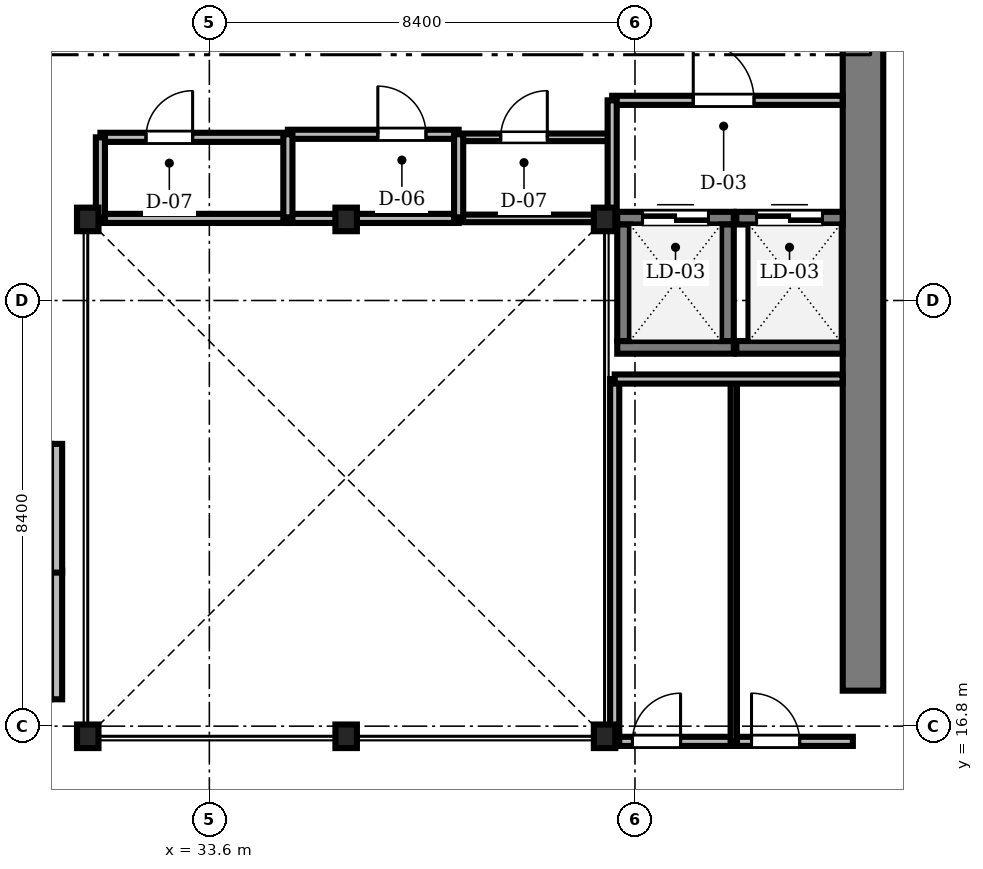
"""IFC4 building model, lengths in metres.
Left out: names, types, materials, properties, quantities, classifications, styles, units other than length and angle.
Written with IfcOpenShell. Run it as: python <this file> out.ifc"""

import sys

from ifc_helpers import new_model, si_unit, direction, frame, frame_2d, origin, origin_2d, place, context, subcontext, project, spatial, rectangle, i_section, extrude, source, transform, mapped, element, fill, save


model = new_model("IFC4")
c1 = context("Model", 3, precision=1e-05, world=origin(), true_north=direction((0.0, 1.0)))
c2 = subcontext(c1, "Body", "Model", "MODEL_VIEW")
j1 = project(units=[si_unit("LENGTHUNIT", "METRE"), si_unit("PLANEANGLEUNIT", "RADIAN")], contexts=[c1])
p1 = place(None, origin())
s1 = spatial("IfcSite", under=j1, at=p1, CompositionType="ELEMENT")
p2 = place(p1, origin())
s2 = spatial("IfcBuilding", under=s1, at=p2, CompositionType="ELEMENT")
p3 = place(p2, frame((0.0, 0.0, 115.0)))
s3 = spatial("IfcBuildingStorey", under=s2, at=p3, CompositionType="ELEMENT", Elevation=115.0)
m1 = source(origin(), c2, "Body", "SweptSolid", [
    extrude(rectangle(XDim=13.15, YDim=0.8, at=frame_2d((6.575, 0.0))), origin(), (0.0, 0.0, 1.0), 3.46),
])
p4 = place(p3, frame((46.5, 17.5, 0.0), z_axis=(0.0, 0.0, 1.0), x_axis=(0.0, 1.0, 0.0)))
e1 = element("IfcWall", 1, at=p4, inside=s3, PredefinedType="SHEAR", context=c2, shape_type="MappedRepresentation", body=[
    mapped(m1, transform((0.0, 0.0, 0.0), scale=1.0)),
])
m2 = source(origin(), c2, "Body", "SweptSolid", [
    extrude(i_section(OverallWidth=0.424, OverallDepth=0.465, WebThickness=0.035, FlangeThickness=0.056, FilletRadius=0.015, at=origin_2d()), origin(), (0.0, 0.0, 1.0), 3.46),
])
for number, where, z_axis, x_axis in (
    (2, (31.2, 16.6, 0.0), (0.0, 0.0, 1.0), (1.0, 0.0, 0.0)),
    (3, (36.3, 16.6, 0.0), (0.0, 0.0, 1.0), (1.0, 0.0, 0.0)),
    (4, (41.4, 16.6, 0.0), (0.0, 0.0, 1.0), (1.0, 0.0, 0.0)),
    (5, (41.4, 26.8, 0.0), (0.0, 0.0, 1.0), (1.0, 0.0, 0.0)),
    (6, (36.3, 26.8, 0.0), (0.0, 0.0, 1.0), (1.0, 0.0, 0.0)),
    (7, (31.2, 26.8, 0.0), (0.0, 0.0, 1.0), (1.0, 0.0, 0.0)),
):
    element("IfcColumn", number, at=place(p3, frame(where, z_axis=z_axis, x_axis=x_axis)), inside=s3, PredefinedType="COLUMN", context=c2, shape_type="MappedRepresentation", body=[
        mapped(m2, transform((0.0, 0.0, 0.0), scale=1.0)),
    ])
m3 = source(origin(), c2, "Body", "SweptSolid", [
    extrude(rectangle(XDim=2.54, YDim=0.22, at=frame_2d((1.27, 0.0))), origin(), (0.0, 0.0, 1.0), 3.46),
])
for number, where, z_axis, x_axis in (
    (8, (30.585, 17.33, 0.0), (0.0, 0.0, 1.0), (0.0, 1.0, 0.0)),
    (9, (30.585, 19.83, 0.0), (0.0, 0.0, 1.0), (0.0, 1.0, 0.0)),
):
    element("IfcWall", number, at=place(p3, frame(where, z_axis=z_axis, x_axis=x_axis)), inside=s3, PredefinedType="SOLIDWALL", context=c2, shape_type="MappedRepresentation", body=[
        mapped(m3, transform((0.0, 0.0, 0.0), scale=1.0)),
    ])
m4 = source(origin(), c2, "Body", "SweptSolid", [
    extrude(rectangle(XDim=2.3, YDim=0.25, at=frame_2d((1.15, 0.0))), origin(), (0.0, 0.0, 1.0), 3.46),
])
p5 = place(p3, frame((41.65, 24.275, 0.0), z_axis=(0.0, 0.0, 1.0), x_axis=(1.0, 0.0, 0.0)))
e10 = element("IfcWall", 10, at=p5, inside=s3, PredefinedType="SOLIDWALL", context=c2, shape_type="MappedRepresentation", body=[
    mapped(m4, transform((0.0, 0.0, 0.0), scale=1.0)),
])
p6 = place(p3, frame((41.65, 26.825, 0.0), z_axis=(0.0, 0.0, 1.0), x_axis=(1.0, 0.0, 0.0)))
e11 = element("IfcWall", 11, at=p6, inside=s3, PredefinedType="SOLIDWALL", context=c2, shape_type="MappedRepresentation", body=[
    mapped(m4, transform((0.0, 0.0, 0.0), scale=1.0)),
])
m5 = source(origin(), c2, "Body", "SweptSolid", [
    extrude(rectangle(XDim=1.3, YDim=2.3, at=frame_2d((0.65, 1.15))), frame((0.0, 0.135, 0.0), z_axis=(0.0, -1.0, 0.0), x_axis=(1.0, 0.0, 0.0)), (0.0, 0.0, 1.0), 0.27),
])
p7 = place(p6, frame((0.5, 0.0, 0.0)))
e12 = element("IfcOpeningElement", 12, at=p7, cuts=e11, PredefinedType="OPENING", context=c2, shape_type="MappedRepresentation", body=[
    mapped(m5, transform((0.0, 0.0, 0.0), scale=1.0)),
])
for number, where, z_axis, x_axis in (
    (13, (41.775, 24.4, 0.0), (0.0, 0.0, 1.0), (0.0, 1.0, 0.0)),
    (14, (43.825, 24.4, 0.0), (0.0, 0.0, 1.0), (0.0, 1.0, 0.0)),
):
    element("IfcWall", number, at=place(p3, frame(where, z_axis=z_axis, x_axis=x_axis)), inside=s3, PredefinedType="SOLIDWALL", context=c2, shape_type="MappedRepresentation", body=[
        mapped(m4, transform((0.0, 0.0, 0.0), scale=1.0)),
    ])
m6 = source(origin(), c2, "Body", "SweptSolid", [
    extrude(rectangle(XDim=2.1, YDim=0.25, at=frame_2d((1.05, 0.0))), origin(), (0.0, 0.0, 1.0), 3.46),
])
p8 = place(p3, frame((44.0, 24.275, 0.0), z_axis=(0.0, 0.0, 1.0), x_axis=(1.0, 0.0, 0.0)))
e15 = element("IfcWall", 15, at=p8, inside=s3, PredefinedType="SOLIDWALL", context=c2, shape_type="MappedRepresentation", body=[
    mapped(m6, transform((0.0, 0.0, 0.0), scale=1.0)),
])
p9 = place(p3, frame((44.0, 26.825, 0.0), z_axis=(0.0, 0.0, 1.0), x_axis=(1.0, 0.0, 0.0)))
e16 = element("IfcWall", 16, at=p9, inside=s3, PredefinedType="SOLIDWALL", context=c2, shape_type="MappedRepresentation", body=[
    mapped(m6, transform((0.0, 0.0, 0.0), scale=1.0)),
])
p10 = place(p9, frame((0.4, 0.0, 0.0)))
e17 = element("IfcOpeningElement", 17, at=p10, cuts=e16, PredefinedType="OPENING", context=c2, shape_type="MappedRepresentation", body=[
    mapped(m5, transform((0.0, 0.0, 0.0), scale=1.0)),
])
m7 = source(origin(), c2, "Body", "SweptSolid", [
    extrude(rectangle(XDim=4.548, YDim=0.18, at=frame_2d((2.274, 0.0))), origin(), (0.0, 0.0, 1.0), 3.092),
])
p11 = place(p3, frame((41.55, 29.15, 0.0), z_axis=(0.0, 0.0, 1.0), x_axis=(1.0, 0.0, 0.0)))
e18 = element("IfcWall", 18, at=p11, inside=s3, PredefinedType="PARTITIONING", context=c2, shape_type="MappedRepresentation", body=[
    mapped(m7, transform((0.0, 0.0, 0.0), scale=1.0)),
])
m8 = source(origin(), c2, "Body", "SweptSolid", [
    extrude(rectangle(XDim=1.2, YDim=2.2, at=frame_2d((0.6, 1.1))), frame((0.0, 0.1, 0.0), z_axis=(0.0, -1.0, 0.0), x_axis=(1.0, 0.0, 0.0)), (0.0, 0.0, 1.0), 0.2),
])
p12 = place(p11, frame((1.6, 0.0, 0.0)))
e19 = element("IfcOpeningElement", 19, at=p12, cuts=e18, PredefinedType="OPENING", context=c2, shape_type="MappedRepresentation", body=[
    mapped(m8, transform((0.0, 0.0, 0.0), scale=1.0)),
])
m9 = source(origin(), c2, "Body", "SweptSolid", [
    extrude(rectangle(XDim=4.7, YDim=0.18, at=frame_2d((2.35, 0.0))), origin(), (0.0, 0.0, 1.0), 2.852),
])
p13 = place(p3, frame((41.6, 16.5, 0.0), z_axis=(0.0, 0.0, 1.0), x_axis=(1.0, 0.0, 0.0)))
e20 = element("IfcWall", 20, at=p13, inside=s3, PredefinedType="PARTITIONING", context=c2, shape_type="MappedRepresentation", body=[
    mapped(m9, transform((0.0, 0.0, 0.0), scale=1.0)),
])
m10 = source(origin(), c2, "Body", "SweptSolid", [
    extrude(rectangle(XDim=0.95, YDim=2.15, at=frame_2d((0.475, 1.075))), frame((0.0, 0.1, 0.0), z_axis=(0.0, -1.0, 0.0), x_axis=(1.0, 0.0, 0.0)), (0.0, 0.0, 1.0), 0.2),
])
p14 = place(p13, frame((0.35, 0.0, 0.0)))
e21 = element("IfcOpeningElement", 21, at=p14, cuts=e20, PredefinedType="OPENING", context=c2, shape_type="MappedRepresentation", body=[
    mapped(m10, transform((0.0, 0.0, 0.0), scale=1.0)),
])
p15 = place(p13, frame((2.7, 0.0, 0.0)))
e22 = element("IfcOpeningElement", 22, at=p15, cuts=e20, PredefinedType="OPENING", context=c2, shape_type="MappedRepresentation", body=[
    mapped(m10, transform((0.0, 0.0, 0.0), scale=1.0)),
])
m11 = source(origin(), c2, "Body", "SweptSolid", [
    extrude(rectangle(XDim=3.7, YDim=0.18, at=frame_2d((1.85, 0.0))), origin(), (0.0, 0.0, 1.0), 3.092),
])
p16 = place(p3, frame((31.45, 28.42, 0.0), z_axis=(0.0, 0.0, 1.0), x_axis=(1.0, 0.0, 0.0)))
e23 = element("IfcWall", 23, at=p16, inside=s3, PredefinedType="PARTITIONING", context=c2, shape_type="MappedRepresentation", body=[
    mapped(m11, transform((0.0, 0.0, 0.0), scale=1.0)),
])
m12 = source(origin(), c2, "Body", "SweptSolid", [
    extrude(rectangle(XDim=0.92, YDim=2.1, at=frame_2d((0.46, 1.05))), frame((0.0, 0.1, 0.0), z_axis=(0.0, -1.0, 0.0), x_axis=(1.0, 0.0, 0.0)), (0.0, 0.0, 1.0), 0.2),
])
p17 = place(p16, frame((0.9, 0.0, 0.0)))
e24 = element("IfcOpeningElement", 24, at=p17, cuts=e23, PredefinedType="OPENING", context=c2, shape_type="MappedRepresentation", body=[
    mapped(m12, transform((0.0, 0.0, 0.0), scale=1.0)),
])
m13 = source(origin(), c2, "Body", "SweptSolid", [
    extrude(rectangle(XDim=3.37, YDim=0.18, at=frame_2d((1.685, 0.0))), origin(), (0.0, 0.0, 1.0), 3.46),
])
p18 = place(p3, frame((35.15, 28.48, 0.0), z_axis=(0.0, 0.0, 1.0), x_axis=(1.0, 0.0, 0.0)))
e25 = element("IfcWall", 25, at=p18, inside=s3, PredefinedType="PARTITIONING", context=c2, shape_type="MappedRepresentation", body=[
    mapped(m13, transform((0.0, 0.0, 0.0), scale=1.0)),
])
p19 = place(p18, frame((1.775, 0.0, 0.0)))
e26 = element("IfcOpeningElement", 26, at=p19, cuts=e25, PredefinedType="OPENING", context=c2, shape_type="MappedRepresentation", body=[
    mapped(m10, transform((0.0, 0.0, 0.0), scale=1.0)),
])
m14 = source(origin(), c2, "Body", "SweptSolid", [
    extrude(rectangle(XDim=3.0, YDim=0.15, at=frame_2d((1.5, 0.0))), origin(), (0.0, 0.0, 1.0), 3.46),
])
p20 = place(p3, frame((38.52, 28.42, 0.0), z_axis=(0.0, 0.0, 1.0), x_axis=(1.0, 0.0, 0.0)))
e27 = element("IfcWall", 27, at=p20, inside=s3, PredefinedType="PARTITIONING", context=c2, shape_type="MappedRepresentation", body=[
    mapped(m14, transform((0.0, 0.0, 0.0), scale=1.0)),
])
m15 = source(origin(), c2, "Body", "SweptSolid", [
    extrude(rectangle(XDim=0.92, YDim=2.1, at=frame_2d((0.46, 1.05))), frame((0.0, 0.085, 0.0), z_axis=(0.0, -1.0, 0.0), x_axis=(1.0, 0.0, 0.0)), (0.0, 0.0, 1.0), 0.17),
])
p21 = place(p20, frame((0.83, 0.0, 0.0)))
e28 = element("IfcOpeningElement", 28, at=p21, cuts=e27, PredefinedType="OPENING", context=c2, shape_type="MappedRepresentation", body=[
    mapped(m15, transform((0.0, 0.0, 0.0), scale=1.0)),
])
m16 = source(origin(), c2, "Body", "SweptSolid", [
    extrude(rectangle(XDim=7.15, YDim=0.18, at=frame_2d((3.575, 0.0))), origin(), (0.0, 0.0, 1.0), 2.852),
])
p22 = place(p3, frame((41.6, 16.5, 0.0), z_axis=(0.0, 0.0, 1.0), x_axis=(0.0, 1.0, 0.0)))
e29 = element("IfcWall", 29, at=p22, inside=s3, PredefinedType="PARTITIONING", context=c2, shape_type="MappedRepresentation", body=[
    mapped(m16, transform((0.0, 0.0, 0.0), scale=1.0)),
])
m17 = source(origin(), c2, "Body", "SweptSolid", [
    extrude(rectangle(XDim=7.15, YDim=0.125, at=frame_2d((3.575, 0.0))), origin(), (0.0, 0.0, 1.0), 2.852),
])
p23 = place(p3, frame((43.95, 16.5, 0.0), z_axis=(0.0, 0.0, 1.0), x_axis=(0.0, 1.0, 0.0)))
e30 = element("IfcWall", 30, at=p23, inside=s3, PredefinedType="PARTITIONING", context=c2, shape_type="MappedRepresentation", body=[
    mapped(m17, transform((0.0, 0.0, 0.0), scale=1.0)),
])
m18 = source(origin(), c2, "Body", "SweptSolid", [
    extrude(rectangle(XDim=4.498, YDim=0.18, at=frame_2d((2.249, 0.0))), origin(), (0.0, 0.0, 1.0), 3.46),
])
p24 = place(p3, frame((41.6, 23.65, 0.0), z_axis=(0.0, 0.0, 1.0), x_axis=(1.0, 0.0, 0.0)))
e31 = element("IfcWall", 31, at=p24, inside=s3, PredefinedType="PARTITIONING", context=c2, shape_type="MappedRepresentation", body=[
    mapped(m18, transform((0.0, 0.0, 0.0), scale=1.0)),
])
m19 = source(origin(), c2, "Body", "SweptSolid", [
    extrude(rectangle(XDim=3.7, YDim=0.18, at=frame_2d((1.85, 0.0))), origin(), (0.0, 0.0, 1.0), 3.002),
])
p25 = place(p3, frame((31.45, 26.82, 0.0), z_axis=(0.0, 0.0, 1.0), x_axis=(1.0, 0.0, 0.0)))
e32 = element("IfcWall", 32, at=p25, inside=s3, PredefinedType="PARTITIONING", context=c2, shape_type="MappedRepresentation", body=[
    mapped(m19, transform((0.0, 0.0, 0.0), scale=1.0)),
])
m20 = source(origin(), c2, "Body", "SweptSolid", [
    extrude(rectangle(XDim=3.37, YDim=0.18, at=frame_2d((1.685, 0.0))), origin(), (0.0, 0.0, 1.0), 3.002),
])
p26 = place(p3, frame((35.15, 26.82, 0.0), z_axis=(0.0, 0.0, 1.0), x_axis=(1.0, 0.0, 0.0)))
e33 = element("IfcWall", 33, at=p26, inside=s3, PredefinedType="PARTITIONING", context=c2, shape_type="MappedRepresentation", body=[
    mapped(m20, transform((0.0, 0.0, 0.0), scale=1.0)),
])
m21 = source(origin(), c2, "Body", "SweptSolid", [
    extrude(rectangle(XDim=3.0, YDim=0.15, at=frame_2d((1.5, 0.0))), origin(), (0.0, 0.0, 1.0), 2.852),
])
p27 = place(p3, frame((38.52, 26.82, 0.0), z_axis=(0.0, 0.0, 1.0), x_axis=(1.0, 0.0, 0.0)))
e34 = element("IfcWall", 34, at=p27, inside=s3, PredefinedType="PARTITIONING", context=c2, shape_type="MappedRepresentation", body=[
    mapped(m21, transform((0.0, 0.0, 0.0), scale=1.0)),
])
m22 = source(origin(), c2, "Body", "SweptSolid", [
    extrude(rectangle(XDim=2.35, YDim=0.18, at=frame_2d((1.175, 0.0))), origin(), (0.0, 0.0, 1.0), 2.852),
])
p28 = place(p3, frame((41.55, 26.8, 0.0), z_axis=(0.0, 0.0, 1.0), x_axis=(0.0, 1.0, 0.0)))
e35 = element("IfcWall", 35, at=p28, inside=s3, PredefinedType="PARTITIONING", context=c2, shape_type="MappedRepresentation", body=[
    mapped(m22, transform((0.0, 0.0, 0.0), scale=1.0)),
])
m23 = source(origin(), c2, "Body", "SweptSolid", [
    extrude(rectangle(XDim=1.66, YDim=0.18, at=frame_2d((0.83, 0.0))), origin(), (0.0, 0.0, 1.0), 3.002),
])
for number, where, z_axis, x_axis in (
    (36, (35.15, 26.82, 0.0), (0.0, 0.0, 1.0), (0.0, 1.0, 0.0)),
    (37, (38.52, 26.82, 0.0), (0.0, 0.0, 1.0), (0.0, 1.0, 0.0)),
):
    element("IfcWall", number, at=place(p3, frame(where, z_axis=z_axis, x_axis=x_axis)), inside=s3, PredefinedType="PARTITIONING", context=c2, shape_type="MappedRepresentation", body=[
        mapped(m23, transform((0.0, 0.0, 0.0), scale=1.0)),
    ])
m24 = source(origin(), c2, "Body", "SweptSolid", [
    extrude(rectangle(XDim=1.6, YDim=0.18, at=frame_2d((0.8, 0.0))), origin(), (0.0, 0.0, 1.0), 3.002),
])
p29 = place(p3, frame((31.45, 26.82, 0.0), z_axis=(0.0, 0.0, 1.0), x_axis=(0.0, 1.0, 0.0)))
e38 = element("IfcWall", 38, at=p29, inside=s3, PredefinedType="PARTITIONING", context=c2, shape_type="MappedRepresentation", body=[
    mapped(m24, transform((0.0, 0.0, 0.0), scale=1.0)),
])
m25 = source(origin(), c2, "Body", "SweptSolid", [
    extrude(rectangle(XDim=1.3, YDim=2.3, at=frame_2d((0.65, 1.15))), frame((0.0, 0.025, 0.0), z_axis=(0.0, -1.0, 0.0), x_axis=(1.0, 0.0, 0.0)), (0.0, 0.0, 1.0), 0.05),
])
p30 = place(p7, origin())
e39 = element("IfcDoor", 39, at=p30, inside=s3, OperationType="DOUBLE_DOOR_SLIDING", PredefinedType="DOOR", context=c2, shape_type="MappedRepresentation", body=[
    mapped(m25, transform((0.0, 0.0, 0.0), scale=1.0)),
])
fill(e12, e39)
p31 = place(p10, origin())
e40 = element("IfcDoor", 40, at=p31, inside=s3, OperationType="DOUBLE_DOOR_SLIDING", PredefinedType="DOOR", context=c2, shape_type="MappedRepresentation", body=[
    mapped(m25, transform((0.0, 0.0, 0.0), scale=1.0)),
])
fill(e17, e40)
m26 = source(origin(), c2, "Body", "SweptSolid", [
    extrude(rectangle(XDim=1.2, YDim=2.2, at=frame_2d((0.6, 1.1))), frame((0.0, 0.025, 0.0), z_axis=(0.0, -1.0, 0.0), x_axis=(1.0, 0.0, 0.0)), (0.0, 0.0, 1.0), 0.05),
])
p32 = place(p12, origin())
e41 = element("IfcDoor", 41, at=p32, inside=s3, OperationType="SINGLE_SWING_LEFT", PredefinedType="DOOR", context=c2, shape_type="MappedRepresentation", body=[
    mapped(m26, transform((0.0, 0.0, 0.0), scale=1.0)),
])
fill(e19, e41)
m27 = source(origin(), c2, "Body", "SweptSolid", [
    extrude(rectangle(XDim=0.95, YDim=2.15, at=frame_2d((0.475, 1.075))), frame((0.0, 0.025, 0.0), z_axis=(0.0, -1.0, 0.0), x_axis=(1.0, 0.0, 0.0)), (0.0, 0.0, 1.0), 0.05),
])
p33 = place(p14, origin())
e42 = element("IfcDoor", 42, at=p33, inside=s3, OperationType="SINGLE_SWING_RIGHT", PredefinedType="DOOR", context=c2, shape_type="MappedRepresentation", body=[
    mapped(m27, transform((0.0, 0.0, 0.0), scale=1.0)),
])
fill(e21, e42)
p34 = place(p15, origin())
e43 = element("IfcDoor", 43, at=p34, inside=s3, OperationType="SINGLE_SWING_LEFT", PredefinedType="DOOR", context=c2, shape_type="MappedRepresentation", body=[
    mapped(m27, transform((0.0, 0.0, 0.0), scale=1.0)),
])
fill(e22, e43)
m28 = source(origin(), c2, "Body", "SweptSolid", [
    extrude(rectangle(XDim=0.92, YDim=2.1, at=frame_2d((0.46, 1.05))), frame((0.0, 0.025, 0.0), z_axis=(0.0, -1.0, 0.0), x_axis=(1.0, 0.0, 0.0)), (0.0, 0.0, 1.0), 0.05),
])
p35 = place(p17, origin())
e44 = element("IfcDoor", 44, at=p35, inside=s3, OperationType="SINGLE_SWING_RIGHT", PredefinedType="DOOR", context=c2, shape_type="MappedRepresentation", body=[
    mapped(m28, transform((0.0, 0.0, 0.0), scale=1.0)),
])
fill(e24, e44)
p36 = place(p19, origin())
e45 = element("IfcDoor", 45, at=p36, inside=s3, OperationType="SINGLE_SWING_LEFT", PredefinedType="DOOR", context=c2, shape_type="MappedRepresentation", body=[
    mapped(m27, transform((0.0, 0.0, 0.0), scale=1.0)),
])
fill(e26, e45)
p37 = place(p21, origin())
e46 = element("IfcDoor", 46, at=p37, inside=s3, OperationType="SINGLE_SWING_RIGHT", PredefinedType="DOOR", context=c2, shape_type="MappedRepresentation", body=[
    mapped(m28, transform((0.0, 0.0, 0.0), scale=1.0)),
])
fill(e28, e46)
save(model, sys.argv[1])
